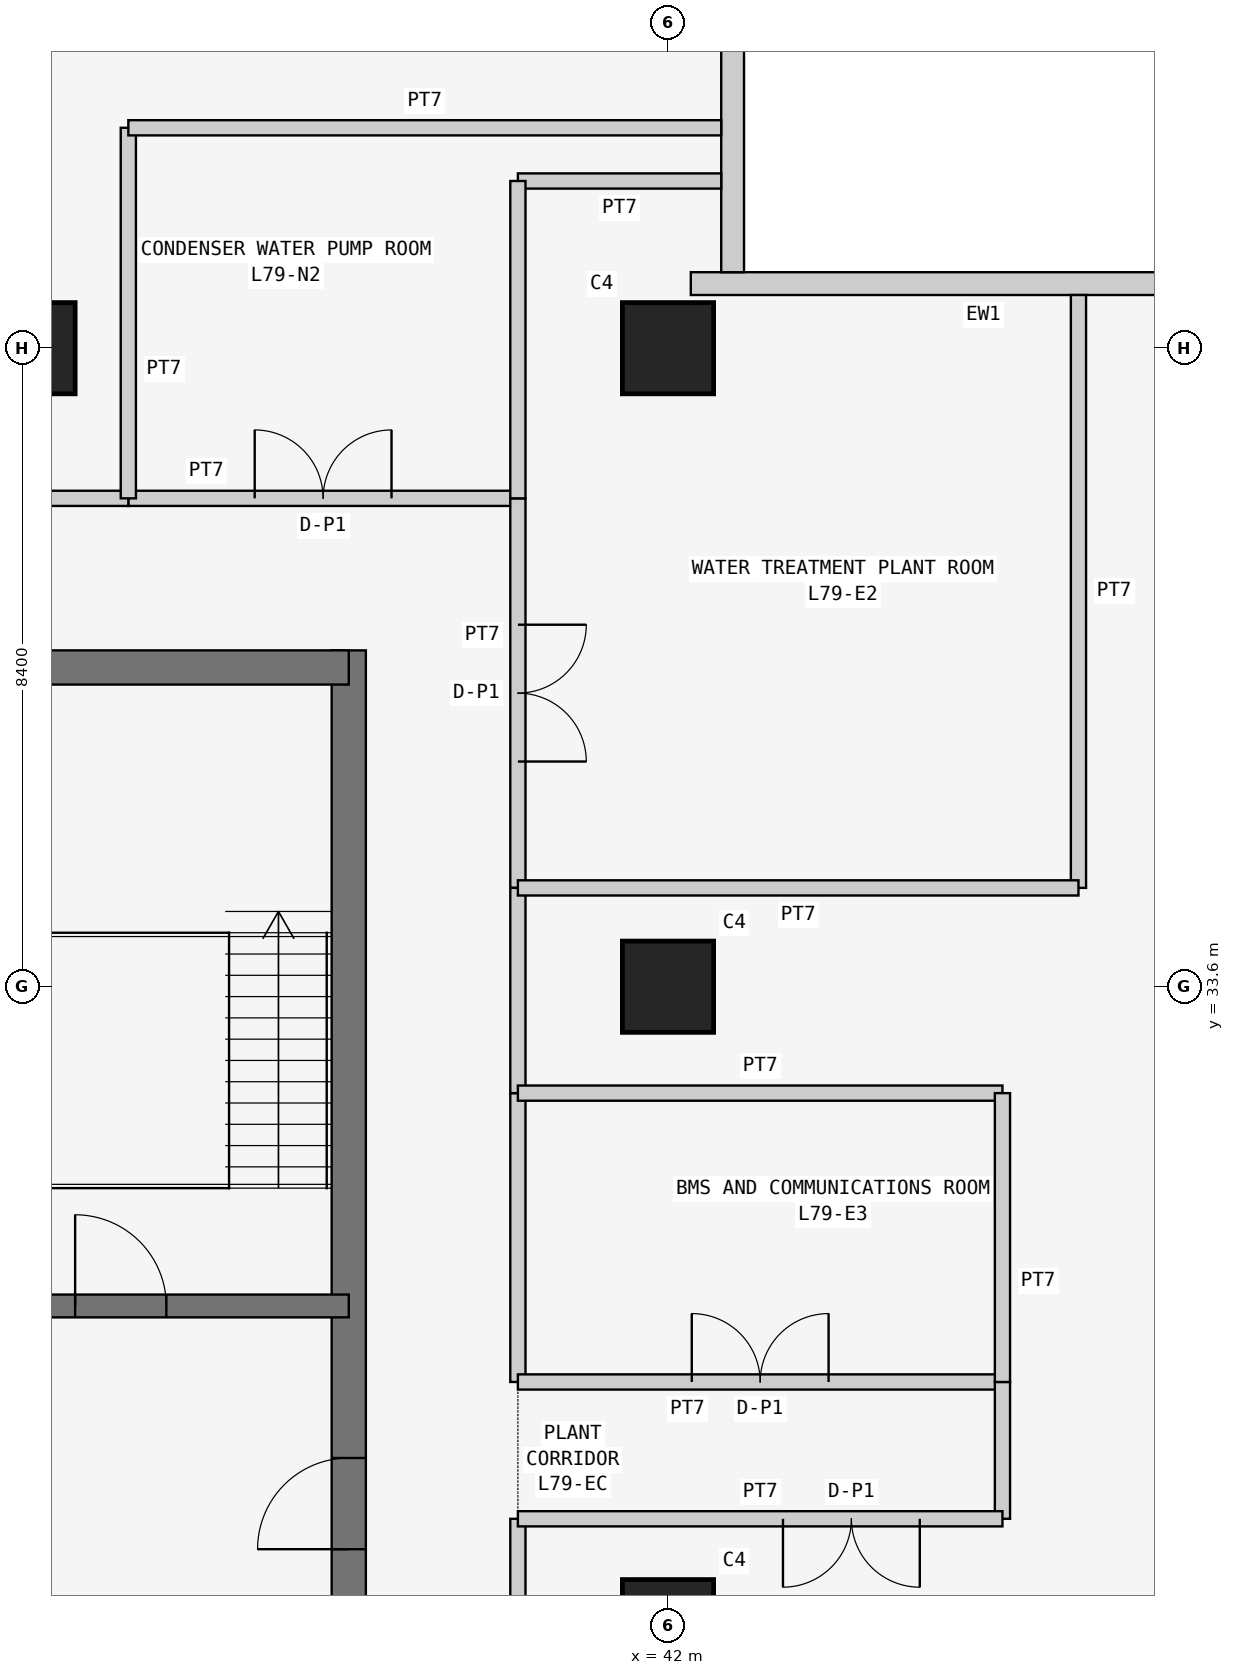
"""IFC4 building model, lengths in metres.
Left out: names, types, materials, properties, quantities, classifications, styles, units other than length and angle.
Written with IfcOpenShell. Run it as: python <this file> out.ifc"""

import sys

from ifc_helpers import new_model, si_unit, direction, frame, frame_2d, origin, origin_2d, place, context, subcontext, project, spatial, rectangle, extrude, element, fill, save


model = new_model("IFC4")
c1 = context("Model", 3, precision=1e-05, world=origin(), true_north=direction((0.0, 1.0)))
c2 = subcontext(c1, "Body", "Model", "MODEL_VIEW")
j1 = project(units=[si_unit("LENGTHUNIT", "METRE"), si_unit("PLANEANGLEUNIT", "RADIAN")], contexts=[c1])
p1 = place(None, origin())
s1 = spatial("IfcSite", under=j1, at=p1, CompositionType="ELEMENT")
p2 = place(p1, origin())
s2 = spatial("IfcBuilding", under=s1, at=p2, CompositionType="ELEMENT")
p3 = place(p2, frame((0.0, 0.0, 300.9)))
s3 = spatial("IfcBuildingStorey", under=s2, at=p3, CompositionType="ELEMENT", Elevation=300.9)
for number, where, z_axis, x_axis in (
    (1, (33.6, 42.0, 0.0), (0.0, 0.0, 1.0), (1.0, 0.0, 0.0)),
    (2, (42.0, 25.2, 0.0), (0.0, 0.0, 1.0), (1.0, 0.0, 0.0)),
    (3, (42.0, 33.6, 0.0), (0.0, 0.0, 1.0), (1.0, 0.0, 0.0)),
    (4, (42.0, 42.0, 0.0), (0.0, 0.0, 1.0), (1.0, 0.0, 0.0)),
):
    element("IfcColumn", number, at=place(p3, frame(where, z_axis=z_axis, x_axis=x_axis)), inside=s3, PredefinedType="COLUMN", context=c2, shape_type="SweptSolid", body=[
        extrude(rectangle(XDim=1.2, YDim=1.2, at=origin_2d()), origin(), (0.0, 0.0, 1.0), 4.5),
    ])
p4 = place(p3, frame((37.8, 21.0, 0.0), z_axis=(0.0, 0.0, 1.0), x_axis=(0.0, 1.0, 0.0)))
e5 = element("IfcWall", 5, at=p4, inside=s3, PredefinedType="SHEAR", context=c2, shape_type="SweptSolid", body=[
    extrude(rectangle(XDim=17.025, YDim=0.45, at=frame_2d((8.512, 0.0))), origin(), (0.0, 0.0, 1.0), 4.5),
])
p5 = place(p4, frame((5.2, 0.0, 0.0)))
e6 = element("IfcOpeningElement", 6, at=p5, cuts=e5, PredefinedType="OPENING", context=c2, shape_type="SweptSolid", body=[
    extrude(rectangle(XDim=1.2, YDim=2.1, at=frame_2d((0.6, 1.05))), frame((0.0, 0.235, 0.0), z_axis=(0.0, -1.0, 0.0), x_axis=(1.0, 0.0, 0.0)), (0.0, 0.0, 1.0), 0.47),
])
p6 = place(p3, frame((37.8, 37.8, 0.0), z_axis=(0.0, 0.0, 1.0), x_axis=(-1.0, 0.0, 0.0)))
e7 = element("IfcWall", 7, at=p6, inside=s3, PredefinedType="SHEAR", context=c2, shape_type="SweptSolid", body=[
    extrude(rectangle(XDim=17.025, YDim=0.45, at=frame_2d((8.513, 0.0))), origin(), (0.0, 0.0, 1.0), 4.5),
])
p7 = place(p3, frame((32.2, 29.4, 0.0), z_axis=(0.0, 0.0, 1.0), x_axis=(1.0, 0.0, 0.0)))
e8 = element("IfcWall", 8, at=p7, inside=s3, PredefinedType="SHEAR", context=c2, shape_type="SweptSolid", body=[
    extrude(rectangle(XDim=5.6, YDim=0.3, at=frame_2d((2.8, 0.0))), origin(), (0.0, 0.0, 1.0), 4.5),
])
p8 = place(p7, frame((2.0, 0.0, 0.0)))
e9 = element("IfcOpeningElement", 9, at=p8, cuts=e8, PredefinedType="OPENING", context=c2, shape_type="SweptSolid", body=[
    extrude(rectangle(XDim=1.2, YDim=2.1, at=frame_2d((0.6, 1.05))), frame((0.0, 0.16, 0.0), z_axis=(0.0, -1.0, 0.0), x_axis=(1.0, 0.0, 0.0)), (0.0, 0.0, 1.0), 0.32),
])
p9 = place(p3, frame((50.0, 42.85, 0.0), z_axis=(0.0, 0.0, 1.0), x_axis=(-1.0, 0.0, 0.0)))
e10 = element("IfcWall", 10, at=p9, inside=s3, PredefinedType="SOLIDWALL", context=c2, shape_type="SweptSolid", body=[
    extrude(rectangle(XDim=7.7, YDim=0.3, at=frame_2d((3.85, 0.0))), origin(), (0.0, 0.0, 1.0), 4.25),
])
p10 = place(p3, frame((42.85, 43.0, 0.0), z_axis=(0.0, 0.0, 1.0), x_axis=(0.0, 1.0, 0.0)))
e11 = element("IfcWall", 11, at=p10, inside=s3, PredefinedType="SOLIDWALL", context=c2, shape_type="SweptSolid", body=[
    extrude(rectangle(XDim=7.0, YDim=0.3, at=frame_2d((3.5, 0.0))), origin(), (0.0, 0.0, 1.0), 4.25),
])
p11 = place(p3, frame((34.9, 40.025, 0.0), z_axis=(0.0, 0.0, 1.0), x_axis=(1.0, 0.0, 0.0)))
e12 = element("IfcWall", 12, at=p11, inside=s3, PredefinedType="PARTITIONING", context=c2, shape_type="SweptSolid", body=[
    extrude(rectangle(XDim=5.125, YDim=0.2, at=frame_2d((2.562, 0.0))), origin(), (0.0, 0.0, 1.0), 4.25),
])
p12 = place(p11, frame((1.663, 0.0, 0.0)))
e13 = element("IfcOpeningElement", 13, at=p12, cuts=e12, PredefinedType="OPENING", context=c2, shape_type="SweptSolid", body=[
    extrude(rectangle(XDim=1.8, YDim=2.4, at=frame_2d((0.9, 1.2))), frame((0.0, 0.11, 0.0), z_axis=(0.0, -1.0, 0.0), x_axis=(1.0, 0.0, 0.0)), (0.0, 0.0, 1.0), 0.22),
])
p13 = place(p3, frame((32.2, 40.025, 0.0), z_axis=(0.0, 0.0, 1.0), x_axis=(1.0, 0.0, 0.0)))
e14 = element("IfcWall", 14, at=p13, inside=s3, PredefinedType="PARTITIONING", context=c2, shape_type="SweptSolid", body=[
    extrude(rectangle(XDim=2.7, YDim=0.2, at=frame_2d((1.35, 0.0))), origin(), (0.0, 0.0, 1.0), 4.25),
])
p14 = place(p3, frame((40.025, 40.025, 0.0), z_axis=(0.0, 0.0, 1.0), x_axis=(0.0, -1.0, 0.0)))
e15 = element("IfcWall", 15, at=p14, inside=s3, PredefinedType="PARTITIONING", context=c2, shape_type="SweptSolid", body=[
    extrude(rectangle(XDim=5.125, YDim=0.2, at=frame_2d((2.562, 0.0))), origin(), (0.0, 0.0, 1.0), 4.25),
])
p15 = place(p14, frame((1.663, 0.0, 0.0)))
e16 = element("IfcOpeningElement", 16, at=p15, cuts=e15, PredefinedType="OPENING", context=c2, shape_type="SweptSolid", body=[
    extrude(rectangle(XDim=1.8, YDim=2.4, at=frame_2d((0.9, 1.2))), frame((0.0, 0.11, 0.0), z_axis=(0.0, -1.0, 0.0), x_axis=(1.0, 0.0, 0.0)), (0.0, 0.0, 1.0), 0.22),
])
p16 = place(p3, frame((40.025, 32.2, 0.0), z_axis=(0.0, 0.0, 1.0), x_axis=(0.0, -1.0, 0.0)))
e17 = element("IfcWall", 17, at=p16, inside=s3, PredefinedType="PARTITIONING", context=c2, shape_type="SweptSolid", body=[
    extrude(rectangle(XDim=3.8, YDim=0.2, at=frame_2d((1.9, 0.0))), origin(), (0.0, 0.0, 1.0), 4.25),
])
p17 = place(p3, frame((40.025, 26.6, 0.0), z_axis=(0.0, 0.0, 1.0), x_axis=(0.0, -1.0, 0.0)))
e18 = element("IfcWall", 18, at=p17, inside=s3, PredefinedType="PARTITIONING", context=c2, shape_type="SweptSolid", body=[
    extrude(rectangle(XDim=2.7, YDim=0.2, at=frame_2d((1.35, 0.0))), origin(), (0.0, 0.0, 1.0), 4.25),
])
p18 = place(p3, frame((40.025, 34.9, 0.0), z_axis=(0.0, 0.0, 1.0), x_axis=(0.0, -1.0, 0.0)))
e19 = element("IfcWall", 19, at=p18, inside=s3, PredefinedType="PARTITIONING", context=c2, shape_type="SweptSolid", body=[
    extrude(rectangle(XDim=2.7, YDim=0.2, at=frame_2d((1.35, 0.0))), origin(), (0.0, 0.0, 1.0), 4.25),
])
p19 = place(p3, frame((34.9, 40.025, 0.0), z_axis=(0.0, 0.0, 1.0), x_axis=(0.0, 1.0, 0.0)))
e20 = element("IfcWall", 20, at=p19, inside=s3, PredefinedType="PARTITIONING", context=c2, shape_type="SweptSolid", body=[
    extrude(rectangle(XDim=4.875, YDim=0.2, at=frame_2d((2.438, 0.0))), origin(), (0.0, 0.0, 1.0), 4.25),
])
p20 = place(p3, frame((34.9, 44.9, 0.0), z_axis=(0.0, 0.0, 1.0), x_axis=(1.0, 0.0, 0.0)))
e21 = element("IfcWall", 21, at=p20, inside=s3, PredefinedType="PARTITIONING", context=c2, shape_type="SweptSolid", body=[
    extrude(rectangle(XDim=7.8, YDim=0.2, at=frame_2d((3.9, 0.0))), origin(), (0.0, 0.0, 1.0), 4.25),
])
p21 = place(p3, frame((42.7, 44.2, 0.0), z_axis=(0.0, 0.0, 1.0), x_axis=(-1.0, 0.0, 0.0)))
e22 = element("IfcWall", 22, at=p21, inside=s3, PredefinedType="PARTITIONING", context=c2, shape_type="SweptSolid", body=[
    extrude(rectangle(XDim=2.675, YDim=0.2, at=frame_2d((1.337, 0.0))), origin(), (0.0, 0.0, 1.0), 4.25),
])
p22 = place(p3, frame((40.025, 44.2, 0.0), z_axis=(0.0, 0.0, 1.0), x_axis=(0.0, -1.0, 0.0)))
e23 = element("IfcWall", 23, at=p22, inside=s3, PredefinedType="PARTITIONING", context=c2, shape_type="SweptSolid", body=[
    extrude(rectangle(XDim=4.175, YDim=0.2, at=frame_2d((2.087, 0.0))), origin(), (0.0, 0.0, 1.0), 4.25),
])
p23 = place(p3, frame((47.4, 42.7, 0.0), z_axis=(0.0, 0.0, 1.0), x_axis=(0.0, -1.0, 0.0)))
e24 = element("IfcWall", 24, at=p23, inside=s3, PredefinedType="PARTITIONING", context=c2, shape_type="SweptSolid", body=[
    extrude(rectangle(XDim=7.8, YDim=0.2, at=frame_2d((3.9, 0.0))), origin(), (0.0, 0.0, 1.0), 4.25),
])
p24 = place(p3, frame((47.4, 34.9, 0.0), z_axis=(0.0, 0.0, 1.0), x_axis=(-1.0, 0.0, 0.0)))
e25 = element("IfcWall", 25, at=p24, inside=s3, PredefinedType="PARTITIONING", context=c2, shape_type="SweptSolid", body=[
    extrude(rectangle(XDim=7.375, YDim=0.2, at=frame_2d((3.688, 0.0))), origin(), (0.0, 0.0, 1.0), 4.25),
])
p25 = place(p3, frame((40.025, 28.4, 0.0), z_axis=(0.0, 0.0, 1.0), x_axis=(1.0, 0.0, 0.0)))
e26 = element("IfcWall", 26, at=p25, inside=s3, PredefinedType="PARTITIONING", context=c2, shape_type="SweptSolid", body=[
    extrude(rectangle(XDim=6.375, YDim=0.2, at=frame_2d((3.188, 0.0))), origin(), (0.0, 0.0, 1.0), 4.25),
])
p26 = place(p25, frame((2.288, 0.0, 0.0)))
e27 = element("IfcOpeningElement", 27, at=p26, cuts=e26, PredefinedType="OPENING", context=c2, shape_type="SweptSolid", body=[
    extrude(rectangle(XDim=1.8, YDim=2.4, at=frame_2d((0.9, 1.2))), frame((0.0, 0.11, 0.0), z_axis=(0.0, -1.0, 0.0), x_axis=(1.0, 0.0, 0.0)), (0.0, 0.0, 1.0), 0.22),
])
p27 = place(p3, frame((46.4, 28.4, 0.0), z_axis=(0.0, 0.0, 1.0), x_axis=(0.0, -1.0, 0.0)))
e28 = element("IfcWall", 28, at=p27, inside=s3, PredefinedType="PARTITIONING", context=c2, shape_type="SweptSolid", body=[
    extrude(rectangle(XDim=1.8, YDim=0.2, at=frame_2d((0.9, 0.0))), origin(), (0.0, 0.0, 1.0), 4.25),
])
p28 = place(p3, frame((46.4, 26.6, 0.0), z_axis=(0.0, 0.0, 1.0), x_axis=(-1.0, 0.0, 0.0)))
e29 = element("IfcWall", 29, at=p28, inside=s3, PredefinedType="PARTITIONING", context=c2, shape_type="SweptSolid", body=[
    extrude(rectangle(XDim=6.375, YDim=0.2, at=frame_2d((3.188, 0.0))), origin(), (0.0, 0.0, 1.0), 4.25),
])
p29 = place(p28, frame((1.087, 0.0, 0.0)))
e30 = element("IfcOpeningElement", 30, at=p29, cuts=e29, PredefinedType="OPENING", context=c2, shape_type="SweptSolid", body=[
    extrude(rectangle(XDim=1.8, YDim=2.4, at=frame_2d((0.9, 1.2))), frame((0.0, 0.11, 0.0), z_axis=(0.0, -1.0, 0.0), x_axis=(1.0, 0.0, 0.0)), (0.0, 0.0, 1.0), 0.22),
])
p30 = place(p3, frame((40.025, 32.2, 0.0), z_axis=(0.0, 0.0, 1.0), x_axis=(1.0, 0.0, 0.0)))
e31 = element("IfcWall", 31, at=p30, inside=s3, PredefinedType="PARTITIONING", context=c2, shape_type="SweptSolid", body=[
    extrude(rectangle(XDim=6.375, YDim=0.2, at=frame_2d((3.188, 0.0))), origin(), (0.0, 0.0, 1.0), 4.25),
])
p31 = place(p3, frame((46.4, 32.2, 0.0), z_axis=(0.0, 0.0, 1.0), x_axis=(0.0, -1.0, 0.0)))
e32 = element("IfcWall", 32, at=p31, inside=s3, PredefinedType="PARTITIONING", context=c2, shape_type="SweptSolid", body=[
    extrude(rectangle(XDim=3.8, YDim=0.2, at=frame_2d((1.9, 0.0))), origin(), (0.0, 0.0, 1.0), 4.25),
])
p32 = place(p12, origin())
e33 = element("IfcDoor", 33, at=p32, inside=s3, OperationType="DOUBLE_DOOR_SINGLE_SWING", PredefinedType="DOOR", context=c2, shape_type="SweptSolid", body=[
    extrude(rectangle(XDim=1.8, YDim=2.4, at=frame_2d((0.9, 1.2))), frame((0.0, 0.025, 0.0), z_axis=(0.0, -1.0, 0.0), x_axis=(1.0, 0.0, 0.0)), (0.0, 0.0, 1.0), 0.05),
])
fill(e13, e33)
p33 = place(p15, origin())
e34 = element("IfcDoor", 34, at=p33, inside=s3, OperationType="DOUBLE_DOOR_SINGLE_SWING", PredefinedType="DOOR", context=c2, shape_type="SweptSolid", body=[
    extrude(rectangle(XDim=1.8, YDim=2.4, at=frame_2d((0.9, 1.2))), frame((0.0, 0.025, 0.0), z_axis=(0.0, -1.0, 0.0), x_axis=(1.0, 0.0, 0.0)), (0.0, 0.0, 1.0), 0.05),
])
fill(e16, e34)
p34 = place(p26, origin())
e35 = element("IfcDoor", 35, at=p34, inside=s3, OperationType="DOUBLE_DOOR_SINGLE_SWING", PredefinedType="DOOR", context=c2, shape_type="SweptSolid", body=[
    extrude(rectangle(XDim=1.8, YDim=2.4, at=frame_2d((0.9, 1.2))), frame((0.0, 0.025, 0.0), z_axis=(0.0, -1.0, 0.0), x_axis=(1.0, 0.0, 0.0)), (0.0, 0.0, 1.0), 0.05),
])
fill(e27, e35)
p35 = place(p29, origin())
e36 = element("IfcDoor", 36, at=p35, inside=s3, OperationType="DOUBLE_DOOR_SINGLE_SWING", PredefinedType="DOOR", context=c2, shape_type="SweptSolid", body=[
    extrude(rectangle(XDim=1.8, YDim=2.4, at=frame_2d((0.9, 1.2))), frame((0.0, 0.025, 0.0), z_axis=(0.0, -1.0, 0.0), x_axis=(1.0, 0.0, 0.0)), (0.0, 0.0, 1.0), 0.05),
])
fill(e30, e36)
p36 = place(p5, origin())
e37 = element("IfcDoor", 37, at=p36, inside=s3, OperationType="SINGLE_SWING_LEFT", PredefinedType="DOOR", context=c2, shape_type="SweptSolid", body=[
    extrude(rectangle(XDim=1.2, YDim=2.1, at=frame_2d((0.6, 1.05))), frame((0.0, 0.025, 0.0), z_axis=(0.0, -1.0, 0.0), x_axis=(1.0, 0.0, 0.0)), (0.0, 0.0, 1.0), 0.05),
])
fill(e6, e37)
p37 = place(p8, origin())
e38 = element("IfcDoor", 38, at=p37, inside=s3, OperationType="SINGLE_SWING_LEFT", PredefinedType="DOOR", context=c2, shape_type="SweptSolid", body=[
    extrude(rectangle(XDim=1.2, YDim=2.1, at=frame_2d((0.6, 1.05))), frame((0.0, 0.025, 0.0), z_axis=(0.0, -1.0, 0.0), x_axis=(1.0, 0.0, 0.0)), (0.0, 0.0, 1.0), 0.05),
])
fill(e9, e38)
save(model, sys.argv[1])
